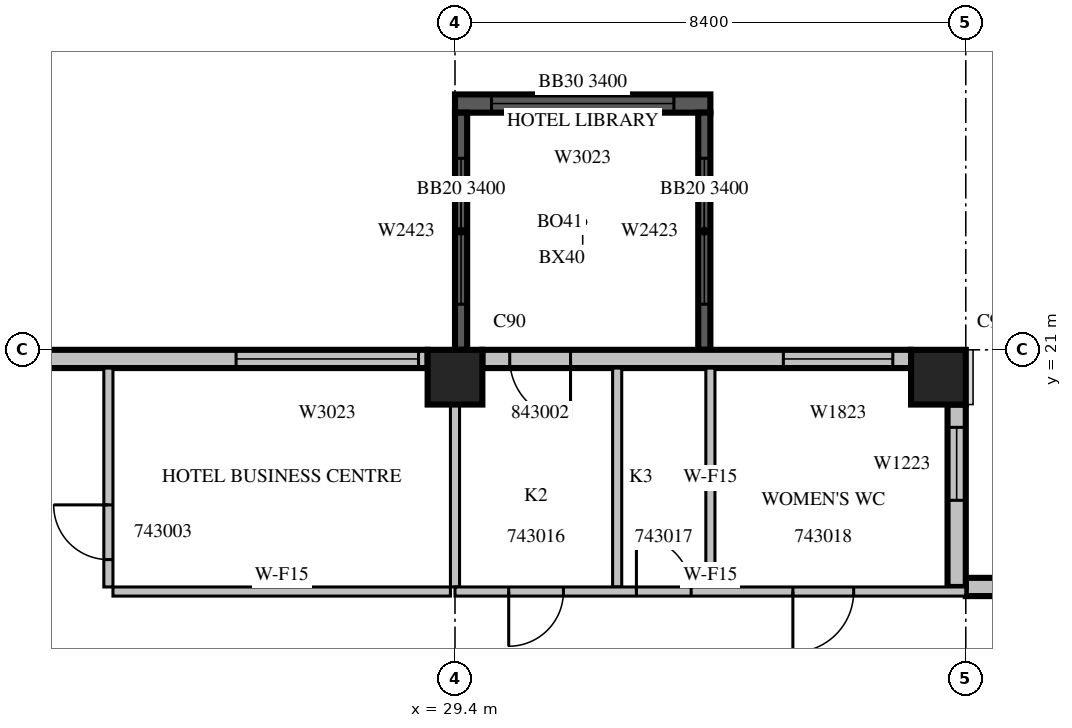
"""IFC4 building model, lengths in metres.
Left out: names, types, materials, properties, quantities, classifications, styles, units other than length and angle.
Written with IfcOpenShell. Run it as: python <this file> out.ifc"""

import sys

from ifc_helpers import new_model, si_unit, direction, frame, frame_2d, origin, origin_2d, place, context, subcontext, project, spatial, rectangle, extrude, source, transform, mapped, element, fill, save


model = new_model("IFC4")
c1 = context("Model", 3, precision=1e-05, world=origin(), true_north=direction((0.0, 1.0)))
c2 = subcontext(c1, "Body", "Model", "MODEL_VIEW")
j1 = project(units=[si_unit("LENGTHUNIT", "METRE"), si_unit("PLANEANGLEUNIT", "RADIAN")], contexts=[c1])
p1 = place(None, origin())
s1 = spatial("IfcSite", under=j1, at=p1, CompositionType="ELEMENT")
p2 = place(p1, origin())
s2 = spatial("IfcBuilding", under=s1, at=p2, CompositionType="ELEMENT")
p3 = place(p2, frame((0.0, 0.0, 196.8)))
s3 = spatial("IfcBuildingStorey", under=s2, at=p3, CompositionType="ELEMENT", Elevation=196.8)
m1 = source(origin(), c2, "Body", "SweptSolid", [
    extrude(rectangle(XDim=0.9, YDim=0.9, at=origin_2d()), origin(), (0.0, 0.0, 1.0), 3.8),
])
for number, where, z_axis, x_axis in (
    (1, (29.4, 20.55, 0.0), (0.0, 0.0, 1.0), (1.0, 0.0, 0.0)),
    (2, (37.35, 20.55, 0.0), (0.0, 0.0, 1.0), (1.0, 0.0, 0.0)),
):
    element("IfcColumn", number, at=place(p3, frame(where, z_axis=z_axis, x_axis=x_axis)), inside=s3, PredefinedType="COLUMN", context=c2, shape_type="MappedRepresentation", body=[
        mapped(m1, transform((0.0, 0.0, 0.0), scale=1.0)),
    ])
m2 = source(origin(), c2, "Body", "SweptSolid", [
    extrude(rectangle(XDim=4.2, YDim=0.3, at=frame_2d((2.1, 0.0))), origin(), (0.0, 0.0, 1.0), 3.4),
])
p4 = place(p3, frame((33.6, 25.05, 0.0), z_axis=(0.0, 0.0, 1.0), x_axis=(-1.0, 0.0, 0.0)))
e3 = element("IfcWall", 3, at=p4, inside=s3, PredefinedType="SOLIDWALL", context=c2, shape_type="MappedRepresentation", body=[
    mapped(m2, transform((0.0, 0.0, 0.0), scale=1.0)),
])
m3 = source(origin(), c2, "Body", "SweptSolid", [
    extrude(rectangle(XDim=3.0, YDim=2.3, at=frame_2d((1.5, 1.15))), frame((0.0, 0.16, 0.0), z_axis=(0.0, -1.0, 0.0), x_axis=(1.0, 0.0, 0.0)), (0.0, 0.0, 1.0), 0.32),
])
p5 = place(p4, frame((0.6, 0.0, 0.6)))
e4 = element("IfcOpeningElement", 4, at=p5, cuts=e3, PredefinedType="OPENING", context=c2, shape_type="MappedRepresentation", body=[
    mapped(m3, transform((0.0, 0.0, 0.0), scale=1.0)),
])
m4 = source(origin(), c2, "Body", "SweptSolid", [
    extrude(rectangle(XDim=3.9, YDim=0.2, at=frame_2d((1.95, 0.0))), origin(), (0.0, 0.0, 1.0), 3.4),
])
p6 = place(p3, frame((33.5, 21.0, 0.0), z_axis=(0.0, 0.0, 1.0), x_axis=(0.0, 1.0, 0.0)))
e5 = element("IfcWall", 5, at=p6, inside=s3, PredefinedType="SOLIDWALL", context=c2, shape_type="MappedRepresentation", body=[
    mapped(m4, transform((0.0, 0.0, 0.0), scale=1.0)),
])
m5 = source(origin(), c2, "Body", "SweptSolid", [
    extrude(rectangle(XDim=2.4, YDim=2.3, at=frame_2d((1.2, 1.15))), frame((0.0, 0.11, 0.0), z_axis=(0.0, -1.0, 0.0), x_axis=(1.0, 0.0, 0.0)), (0.0, 0.0, 1.0), 0.22),
])
p7 = place(p6, frame((0.75, 0.0, 0.6)))
e6 = element("IfcOpeningElement", 6, at=p7, cuts=e5, PredefinedType="OPENING", context=c2, shape_type="MappedRepresentation", body=[
    mapped(m5, transform((0.0, 0.0, 0.0), scale=1.0)),
])
p8 = place(p3, frame((29.5, 21.0, 0.0), z_axis=(0.0, 0.0, 1.0), x_axis=(0.0, 1.0, 0.0)))
e7 = element("IfcWall", 7, at=p8, inside=s3, PredefinedType="SOLIDWALL", context=c2, shape_type="MappedRepresentation", body=[
    mapped(m4, transform((0.0, 0.0, 0.0), scale=1.0)),
])
p9 = place(p8, frame((0.75, 0.0, 0.6)))
e8 = element("IfcOpeningElement", 8, at=p9, cuts=e7, PredefinedType="OPENING", context=c2, shape_type="MappedRepresentation", body=[
    mapped(m5, transform((0.0, 0.0, 0.0), scale=1.0)),
])
m6 = source(origin(), c2, "Body", "SweptSolid", [
    extrude(rectangle(XDim=21.84, YDim=0.3, at=frame_2d((10.92, 0.0))), origin(), (0.0, 0.0, 1.0), 3.4),
])
p10 = place(p3, frame((59.64, 17.1, 0.0), z_axis=(0.0, 0.0, 1.0), x_axis=(-1.0, 0.0, 0.0)))
e9 = element("IfcWall", 9, at=p10, inside=s3, PredefinedType="STANDARD", context=c2, shape_type="MappedRepresentation", body=[
    mapped(m6, transform((0.0, 0.0, 0.0), scale=1.0)),
])
p11 = place(p10, frame((0.6, 0.0, 0.6)))
e10 = element("IfcOpeningElement", 10, at=p11, cuts=e9, PredefinedType="OPENING", context=c2, shape_type="MappedRepresentation", body=[
    mapped(m3, transform((0.0, 0.0, 0.0), scale=1.0)),
])
p12 = place(p10, frame((4.8, 0.0, 0.6)))
e11 = element("IfcOpeningElement", 11, at=p12, cuts=e9, PredefinedType="OPENING", context=c2, shape_type="MappedRepresentation", body=[
    mapped(m3, transform((0.0, 0.0, 0.0), scale=1.0)),
])
m7 = source(origin(), c2, "Body", "SweptSolid", [
    extrude(rectangle(XDim=3.6, YDim=2.3, at=frame_2d((1.8, 1.15))), frame((0.0, 0.16, 0.0), z_axis=(0.0, -1.0, 0.0), x_axis=(1.0, 0.0, 0.0)), (0.0, 0.0, 1.0), 0.32),
])
p13 = place(p10, frame((9.54, 0.0, 0.6)))
e12 = element("IfcOpeningElement", 12, at=p13, cuts=e9, PredefinedType="OPENING", context=c2, shape_type="MappedRepresentation", body=[
    mapped(m7, transform((0.0, 0.0, 0.0), scale=1.0)),
])
p14 = place(p10, frame((15.42, 0.0, 0.6)))
e13 = element("IfcOpeningElement", 13, at=p14, cuts=e9, PredefinedType="OPENING", context=c2, shape_type="MappedRepresentation", body=[
    mapped(m7, transform((0.0, 0.0, 0.0), scale=1.0)),
])
m8 = source(origin(), c2, "Body", "SweptSolid", [
    extrude(rectangle(XDim=3.0, YDim=0.3, at=frame_2d((1.5, 0.0))), origin(), (0.0, 0.0, 1.0), 3.4),
])
p15 = place(p3, frame((37.65, 17.1, 0.0), z_axis=(0.0, 0.0, 1.0), x_axis=(0.0, 1.0, 0.0)))
e14 = element("IfcWall", 14, at=p15, inside=s3, PredefinedType="STANDARD", context=c2, shape_type="MappedRepresentation", body=[
    mapped(m8, transform((0.0, 0.0, 0.0), scale=1.0)),
])
m9 = source(origin(), c2, "Body", "SweptSolid", [
    extrude(rectangle(XDim=1.2, YDim=2.3, at=frame_2d((0.6, 1.15))), frame((0.0, 0.16, 0.0), z_axis=(0.0, -1.0, 0.0), x_axis=(1.0, 0.0, 0.0)), (0.0, 0.0, 1.0), 0.32),
])
p16 = place(p15, frame((1.425, 0.0, 0.6)))
e15 = element("IfcOpeningElement", 15, at=p16, cuts=e14, PredefinedType="OPENING", context=c2, shape_type="MappedRepresentation", body=[
    mapped(m9, transform((0.0, 0.0, 0.0), scale=1.0)),
])
m10 = source(origin(), c2, "Body", "SweptSolid", [
    extrude(rectangle(XDim=7.05, YDim=0.3, at=frame_2d((3.525, 0.0))), origin(), (0.0, 0.0, 1.0), 3.4),
])
p17 = place(p3, frame((36.9, 20.85, 0.0), z_axis=(0.0, 0.0, 1.0), x_axis=(-1.0, 0.0, 0.0)))
e16 = element("IfcWall", 16, at=p17, inside=s3, PredefinedType="STANDARD", context=c2, shape_type="MappedRepresentation", body=[
    mapped(m10, transform((0.0, 0.0, 0.0), scale=1.0)),
])
m11 = source(origin(), c2, "Body", "SweptSolid", [
    extrude(rectangle(XDim=1.8, YDim=2.3, at=frame_2d((0.9, 1.15))), frame((0.0, 0.16, 0.0), z_axis=(0.0, -1.0, 0.0), x_axis=(1.0, 0.0, 0.0)), (0.0, 0.0, 1.0), 0.32),
])
p18 = place(p17, frame((0.3, 0.0, 0.6)))
e17 = element("IfcOpeningElement", 17, at=p18, cuts=e16, PredefinedType="OPENING", context=c2, shape_type="MappedRepresentation", body=[
    mapped(m11, transform((0.0, 0.0, 0.0), scale=1.0)),
])
m12 = source(origin(), c2, "Body", "SweptSolid", [
    extrude(rectangle(XDim=1.0, YDim=2.1, at=frame_2d((0.5, 1.05))), frame((0.0, 0.16, 0.0), z_axis=(0.0, -1.0, 0.0), x_axis=(1.0, 0.0, 0.0)), (0.0, 0.0, 1.0), 0.32),
])
p19 = place(p17, frame((5.6, 0.0, 0.0)))
e18 = element("IfcOpeningElement", 18, at=p19, cuts=e16, PredefinedType="OPENING", context=c2, shape_type="MappedRepresentation", body=[
    mapped(m12, transform((0.0, 0.0, 0.0), scale=1.0)),
])
m13 = source(origin(), c2, "Body", "SweptSolid", [
    extrude(rectangle(XDim=7.15, YDim=0.3, at=frame_2d((3.575, 0.0))), origin(), (0.0, 0.0, 1.0), 3.4),
])
p20 = place(p3, frame((28.95, 20.85, 0.0), z_axis=(0.0, 0.0, 1.0), x_axis=(-1.0, 0.0, 0.0)))
e19 = element("IfcWall", 19, at=p20, inside=s3, PredefinedType="STANDARD", context=c2, shape_type="MappedRepresentation", body=[
    mapped(m13, transform((0.0, 0.0, 0.0), scale=1.0)),
])
p21 = place(p20, frame((0.15, 0.0, 0.6)))
e20 = element("IfcOpeningElement", 20, at=p21, cuts=e19, PredefinedType="OPENING", context=c2, shape_type="MappedRepresentation", body=[
    mapped(m3, transform((0.0, 0.0, 0.0), scale=1.0)),
])
m14 = source(origin(), c2, "Body", "SweptSolid", [
    extrude(rectangle(XDim=3.6, YDim=0.15, at=frame_2d((1.8, 0.0))), origin(), (0.0, 0.0, 1.0), 3.4),
])
p22 = place(p3, frame((23.7, 20.7, 0.0), z_axis=(0.0, 0.0, 1.0), x_axis=(0.0, -1.0, 0.0)))
e21 = element("IfcWall", 21, at=p22, inside=s3, PredefinedType="PARTITIONING", context=c2, shape_type="MappedRepresentation", body=[
    mapped(m14, transform((0.0, 0.0, 0.0), scale=1.0)),
])
m15 = source(origin(), c2, "Body", "SweptSolid", [
    extrude(rectangle(XDim=0.9, YDim=2.1, at=frame_2d((0.45, 1.05))), frame((0.0, 0.085, 0.0), z_axis=(0.0, -1.0, 0.0), x_axis=(1.0, 0.0, 0.0)), (0.0, 0.0, 1.0), 0.17),
])
p23 = place(p22, frame((2.25, 0.0, 0.0)))
e22 = element("IfcOpeningElement", 22, at=p23, cuts=e21, PredefinedType="OPENING", context=c2, shape_type="MappedRepresentation", body=[
    mapped(m15, transform((0.0, 0.0, 0.0), scale=1.0)),
])
m16 = source(origin(), c2, "Body", "SweptSolid", [
    extrude(rectangle(XDim=5.55, YDim=0.15, at=frame_2d((2.775, 0.0))), origin(), (0.0, 0.0, 1.0), 3.4),
])
p24 = place(p3, frame((23.775, 17.025, 0.0), z_axis=(0.0, 0.0, 1.0), x_axis=(1.0, 0.0, 0.0)))
e23 = element("IfcWall", 23, at=p24, inside=s3, PredefinedType="PARTITIONING", context=c2, shape_type="MappedRepresentation", body=[
    mapped(m16, transform((0.0, 0.0, 0.0), scale=1.0)),
])
m17 = source(origin(), c2, "Body", "SweptSolid", [
    extrude(rectangle(XDim=3.001, YDim=0.15, at=frame_2d((1.5, 0.0))), origin(), (0.0, 0.0, 1.0), 3.4),
])
p25 = place(p3, frame((29.4, 17.1, 0.0), z_axis=(0.0, 0.0, 1.0), x_axis=(0.0, 1.0, 0.0)))
e24 = element("IfcWall", 24, at=p25, inside=s3, PredefinedType="PARTITIONING", context=c2, shape_type="MappedRepresentation", body=[
    mapped(m17, transform((0.0, 0.0, 0.0), scale=1.0)),
])
for number, where, z_axis, x_axis in (
    (25, (32.067, 20.7, 0.0), (0.0, 0.0, 1.0), (0.0, -1.0, 0.0)),
    (26, (33.6, 17.1, 0.0), (0.0, 0.0, 1.0), (0.0, 1.0, 0.0)),
):
    element("IfcWall", number, at=place(p3, frame(where, z_axis=z_axis, x_axis=x_axis)), inside=s3, PredefinedType="PARTITIONING", context=c2, shape_type="MappedRepresentation", body=[
        mapped(m14, transform((0.0, 0.0, 0.0), scale=1.0)),
    ])
m18 = source(origin(), c2, "Body", "SweptSolid", [
    extrude(rectangle(XDim=8.4, YDim=0.15, at=frame_2d((4.2, 0.0))), origin(), (0.0, 0.0, 1.0), 3.4),
])
p26 = place(p3, frame((29.4, 17.025, 0.0), z_axis=(0.0, 0.0, 1.0), x_axis=(1.0, 0.0, 0.0)))
e27 = element("IfcWall", 27, at=p26, inside=s3, PredefinedType="PARTITIONING", context=c2, shape_type="MappedRepresentation", body=[
    mapped(m18, transform((0.0, 0.0, 0.0), scale=1.0)),
])
p27 = place(p26, frame((0.883, 0.0, 0.0)))
e28 = element("IfcOpeningElement", 28, at=p27, cuts=e27, PredefinedType="OPENING", context=c2, shape_type="MappedRepresentation", body=[
    mapped(m15, transform((0.0, 0.0, 0.0), scale=1.0)),
])
p28 = place(p26, frame((2.983, 0.0, 0.0)))
e29 = element("IfcOpeningElement", 29, at=p28, cuts=e27, PredefinedType="OPENING", context=c2, shape_type="MappedRepresentation", body=[
    mapped(m15, transform((0.0, 0.0, 0.0), scale=1.0)),
])
m19 = source(origin(), c2, "Body", "SweptSolid", [
    extrude(rectangle(XDim=1.0, YDim=2.1, at=frame_2d((0.5, 1.05))), frame((0.0, 0.085, 0.0), z_axis=(0.0, -1.0, 0.0), x_axis=(1.0, 0.0, 0.0)), (0.0, 0.0, 1.0), 0.17),
])
p29 = place(p26, frame((5.557, 0.0, 0.0)))
e30 = element("IfcOpeningElement", 30, at=p29, cuts=e27, PredefinedType="OPENING", context=c2, shape_type="MappedRepresentation", body=[
    mapped(m19, transform((0.0, 0.0, 0.0), scale=1.0)),
])
m20 = source(origin(), c2, "Body", "SweptSolid", [
    extrude(rectangle(XDim=3.0, YDim=2.3, at=frame_2d((1.5, 1.15))), frame((0.0, 0.03, 0.0), z_axis=(0.0, -1.0, 0.0), x_axis=(1.0, 0.0, 0.0)), (0.0, 0.0, 1.0), 0.06),
])
p30 = place(p5, origin())
e31 = element("IfcWindow", 31, at=p30, inside=s3, PartitioningType="SINGLE_PANEL", PredefinedType="WINDOW", context=c2, shape_type="MappedRepresentation", body=[
    mapped(m20, transform((0.0, 0.0, 0.0), scale=1.0)),
])
fill(e4, e31)
m21 = source(origin(), c2, "Body", "SweptSolid", [
    extrude(rectangle(XDim=2.4, YDim=2.3, at=frame_2d((1.2, 1.15))), frame((0.0, 0.03, 0.0), z_axis=(0.0, -1.0, 0.0), x_axis=(1.0, 0.0, 0.0)), (0.0, 0.0, 1.0), 0.06),
])
p31 = place(p7, origin())
e32 = element("IfcWindow", 32, at=p31, inside=s3, PartitioningType="SINGLE_PANEL", PredefinedType="WINDOW", context=c2, shape_type="MappedRepresentation", body=[
    mapped(m21, transform((0.0, 0.0, 0.0), scale=1.0)),
])
fill(e6, e32)
p32 = place(p9, origin())
e33 = element("IfcWindow", 33, at=p32, inside=s3, PartitioningType="SINGLE_PANEL", PredefinedType="WINDOW", context=c2, shape_type="MappedRepresentation", body=[
    mapped(m21, transform((0.0, 0.0, 0.0), scale=1.0)),
])
fill(e8, e33)
m22 = source(origin(), c2, "Body", "SweptSolid", [
    extrude(rectangle(XDim=1.2, YDim=2.3, at=frame_2d((0.6, 1.15))), frame((0.0, 0.03, 0.0), z_axis=(0.0, -1.0, 0.0), x_axis=(1.0, 0.0, 0.0)), (0.0, 0.0, 1.0), 0.06),
])
p33 = place(p16, origin())
e34 = element("IfcWindow", 34, at=p33, inside=s3, PartitioningType="SINGLE_PANEL", PredefinedType="WINDOW", context=c2, shape_type="MappedRepresentation", body=[
    mapped(m22, transform((0.0, 0.0, 0.0), scale=1.0)),
])
fill(e15, e34)
m23 = source(origin(), c2, "Body", "SweptSolid", [
    extrude(rectangle(XDim=1.8, YDim=2.3, at=frame_2d((0.9, 1.15))), frame((0.0, 0.03, 0.0), z_axis=(0.0, -1.0, 0.0), x_axis=(1.0, 0.0, 0.0)), (0.0, 0.0, 1.0), 0.06),
])
p34 = place(p18, origin())
e35 = element("IfcWindow", 35, at=p34, inside=s3, PartitioningType="SINGLE_PANEL", PredefinedType="WINDOW", context=c2, shape_type="MappedRepresentation", body=[
    mapped(m23, transform((0.0, 0.0, 0.0), scale=1.0)),
])
fill(e17, e35)
p35 = place(p21, origin())
e36 = element("IfcWindow", 36, at=p35, inside=s3, PartitioningType="SINGLE_PANEL", PredefinedType="WINDOW", context=c2, shape_type="MappedRepresentation", body=[
    mapped(m20, transform((0.0, 0.0, 0.0), scale=1.0)),
])
fill(e20, e36)
m24 = source(origin(), c2, "Body", "SweptSolid", [
    extrude(rectangle(XDim=0.9, YDim=2.1, at=frame_2d((0.45, 1.05))), frame((0.0, 0.025, 0.0), z_axis=(0.0, -1.0, 0.0), x_axis=(1.0, 0.0, 0.0)), (0.0, 0.0, 1.0), 0.05),
])
p36 = place(p23, origin())
e37 = element("IfcDoor", 37, at=p36, inside=s3, OperationType="SINGLE_SWING_RIGHT", PredefinedType="DOOR", context=c2, shape_type="MappedRepresentation", body=[
    mapped(m24, transform((0.0, 0.0, 0.0), scale=1.0)),
])
fill(e22, e37)
p37 = place(p27, origin())
e38 = element("IfcDoor", 38, at=p37, inside=s3, OperationType="SINGLE_SWING_RIGHT", PredefinedType="DOOR", context=c2, shape_type="MappedRepresentation", body=[
    mapped(m24, transform((0.0, 0.0, 0.0), scale=1.0)),
])
fill(e28, e38)
p38 = place(p28, origin())
e39 = element("IfcDoor", 39, at=p38, inside=s3, OperationType="SINGLE_SWING_LEFT", PredefinedType="DOOR", context=c2, shape_type="MappedRepresentation", body=[
    mapped(m24, transform((0.0, 0.0, 0.0), scale=1.0)),
])
fill(e29, e39)
m25 = source(origin(), c2, "Body", "SweptSolid", [
    extrude(rectangle(XDim=1.0, YDim=2.1, at=frame_2d((0.5, 1.05))), frame((0.0, 0.025, 0.0), z_axis=(0.0, -1.0, 0.0), x_axis=(1.0, 0.0, 0.0)), (0.0, 0.0, 1.0), 0.05),
])
p39 = place(p29, origin())
e40 = element("IfcDoor", 40, at=p39, inside=s3, OperationType="SINGLE_SWING_RIGHT", PredefinedType="DOOR", context=c2, shape_type="MappedRepresentation", body=[
    mapped(m25, transform((0.0, 0.0, 0.0), scale=1.0)),
])
fill(e30, e40)
p40 = place(p19, origin())
e41 = element("IfcDoor", 41, at=p40, inside=s3, OperationType="SINGLE_SWING_LEFT", PredefinedType="DOOR", context=c2, shape_type="MappedRepresentation", body=[
    mapped(m25, transform((0.0, 0.0, 0.0), scale=1.0)),
])
fill(e18, e41)
save(model, sys.argv[1])
